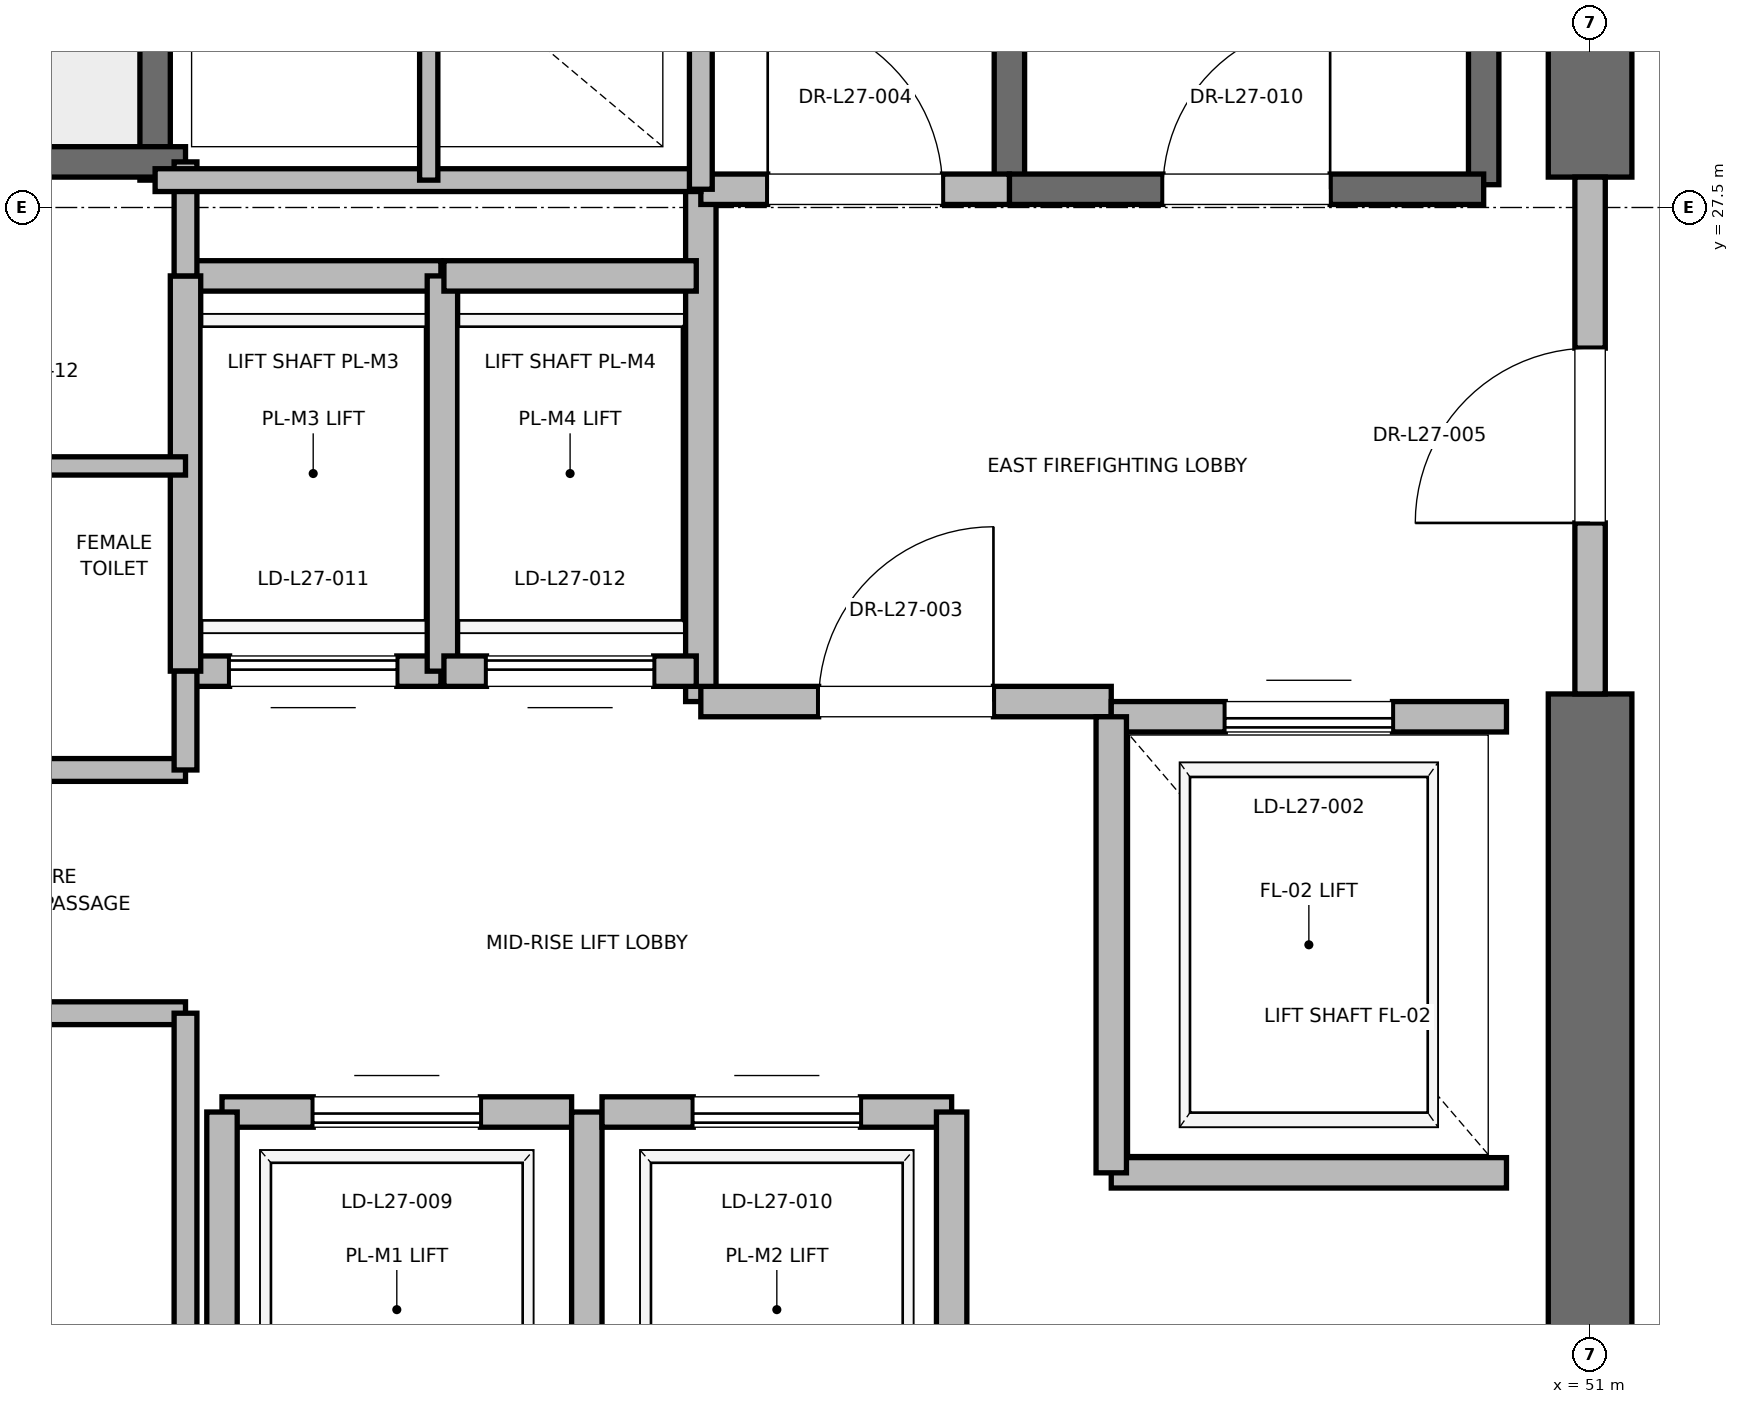
"""IFC4 building model, lengths in metres.
Left out: names, types, materials, properties, quantities, classifications, styles, units other than length and angle.
Written with IfcOpenShell. Run it as: python <this file> out.ifc"""

import sys

from ifc_helpers import new_model, si_unit, direction, frame, frame_2d, origin, place, context, subcontext, project, spatial, rectangle, extrude, element, fill, save


model = new_model("IFC4")
c1 = context("Model", 3, precision=1e-05, world=origin(), true_north=direction((0.0, 1.0)))
c2 = subcontext(c1, "Body", "Model", "MODEL_VIEW")
j1 = project(units=[si_unit("LENGTHUNIT", "METRE"), si_unit("PLANEANGLEUNIT", "RADIAN")], contexts=[c1])
p1 = place(None, origin())
s1 = spatial("IfcSite", under=j1, at=p1, CompositionType="ELEMENT")
p2 = place(p1, origin())
s2 = spatial("IfcBuilding", under=s1, at=p2, CompositionType="ELEMENT")
p3 = place(p2, frame((0.0, 0.0, 118.4)))
s3 = spatial("IfcBuildingStorey", under=s2, at=p3, CompositionType="ELEMENT", Elevation=118.4)
p4 = place(p3, frame((51.0, 18.5, 0.0), z_axis=(0.0, 0.0, 1.0), x_axis=(0.0, 1.0, 0.0)))
e1 = element("IfcWall", 1, at=p4, inside=s3, PredefinedType="SHEAR", context=c2, shape_type="SweptSolid", body=[
    extrude(rectangle(XDim=5.8, YDim=0.55, at=frame_2d((2.9, 0.0))), origin(), (0.0, 0.0, 1.0), 4.7),
])
p5 = place(p3, frame((51.0, 27.7, 0.0), z_axis=(0.0, 0.0, 1.0), x_axis=(0.0, 1.0, 0.0)))
e2 = element("IfcWall", 2, at=p5, inside=s3, PredefinedType="SHEAR", context=c2, shape_type="SweptSolid", body=[
    extrude(rectangle(XDim=8.8, YDim=0.55, at=frame_2d((4.4, 0.0))), origin(), (0.0, 0.0, 1.0), 4.7),
])
p6 = place(p3, frame((50.3, 27.65, 0.0), z_axis=(0.0, 0.0, 1.0), x_axis=(0.0, 1.0, 0.0)))
e3 = element("IfcWall", 3, at=p6, inside=s3, PredefinedType="SOLIDWALL", context=c2, shape_type="SweptSolid", body=[
    extrude(rectangle(XDim=8.15, YDim=0.2, at=frame_2d((4.075, 0.0))), origin(), (0.0, 0.0, 1.0), 4.7),
])
p7 = place(p3, frame((47.18, 27.62, 0.0), z_axis=(0.0, 0.0, 1.0), x_axis=(0.0, 1.0, 0.0)))
e4 = element("IfcWall", 4, at=p7, inside=s3, PredefinedType="SOLIDWALL", context=c2, shape_type="SweptSolid", body=[
    extrude(rectangle(XDim=8.18, YDim=0.2, at=frame_2d((4.09, 0.0))), origin(), (0.0, 0.0, 1.0), 4.7),
])
p8 = place(p3, frame((47.18, 27.62, 0.0), z_axis=(0.0, 0.0, 1.0), x_axis=(1.0, 0.0, 0.0)))
e5 = element("IfcWall", 5, at=p8, inside=s3, PredefinedType="SOLIDWALL", context=c2, shape_type="SweptSolid", body=[
    extrude(rectangle(XDim=3.12, YDim=0.2, at=frame_2d((1.56, 0.0))), origin(), (0.0, 0.0, 1.0), 4.7),
])
p9 = place(p8, frame((1.01, 0.0, 0.0)))
e6 = element("IfcOpeningElement", 6, at=p9, cuts=e5, PredefinedType="OPENING", context=c2, shape_type="SweptSolid", body=[
    extrude(rectangle(XDim=1.1, YDim=2.15, at=frame_2d((0.55, 1.075))), frame((0.0, 0.1, 0.0), z_axis=(0.0, -1.0, 0.0), x_axis=(1.0, 0.0, 0.0)), (0.0, 0.0, 1.0), 0.2),
])
p10 = place(p3, frame((41.56, 27.68, 0.0), z_axis=(0.0, 0.0, 1.0), x_axis=(0.0, 1.0, 0.0)))
e7 = element("IfcWall", 7, at=p10, inside=s3, PredefinedType="SOLIDWALL", context=c2, shape_type="SweptSolid", body=[
    extrude(rectangle(XDim=8.57, YDim=0.2, at=frame_2d((4.285, 0.0))), origin(), (0.0, 0.0, 1.0), 4.7),
])
p11 = place(p3, frame((38.44, 27.8, 0.0), z_axis=(0.0, 0.0, 1.0), x_axis=(1.0, 0.0, 0.0)))
e8 = element("IfcWall", 8, at=p11, inside=s3, PredefinedType="SOLIDWALL", context=c2, shape_type="SweptSolid", body=[
    extrude(rectangle(XDim=3.32, YDim=0.2, at=frame_2d((1.66, 0.0))), origin(), (0.0, 0.0, 1.0), 4.7),
])
p12 = place(p3, frame((45.15, 24.25, 0.0), z_axis=(0.0, 0.0, 1.0), x_axis=(0.0, 1.0, 0.0)))
e9 = element("IfcWall", 9, at=p12, inside=s3, PredefinedType="PARTITIONING", context=c2, shape_type="SweptSolid", body=[
    extrude(rectangle(XDim=3.37, YDim=0.2, at=frame_2d((1.685, 0.0))), origin(), (0.0, 0.0, 1.0), 4.7),
])
p13 = place(p3, frame((45.15, 24.25, 0.0), z_axis=(0.0, 0.0, 1.0), x_axis=(1.0, 0.0, 0.0)))
e10 = element("IfcWall", 10, at=p13, inside=s3, PredefinedType="PARTITIONING", context=c2, shape_type="SweptSolid", body=[
    extrude(rectangle(XDim=2.7, YDim=0.2, at=frame_2d((1.35, 0.0))), origin(), (0.0, 0.0, 1.0), 4.7),
])
p14 = place(p13, frame((0.775, 0.0, 0.0)))
e11 = element("IfcOpeningElement", 11, at=p14, cuts=e10, PredefinedType="OPENING", context=c2, shape_type="SweptSolid", body=[
    extrude(rectangle(XDim=1.15, YDim=2.2, at=frame_2d((0.575, 1.1))), frame((0.0, 0.1, 0.0), z_axis=(0.0, -1.0, 0.0), x_axis=(1.0, 0.0, 0.0)), (0.0, 0.0, 1.0), 0.2),
])
p15 = place(p3, frame((45.15, 27.62, 0.0), z_axis=(0.0, 0.0, 1.0), x_axis=(1.0, 0.0, 0.0)))
e12 = element("IfcWall", 12, at=p15, inside=s3, PredefinedType="PARTITIONING", context=c2, shape_type="SweptSolid", body=[
    extrude(rectangle(XDim=2.03, YDim=0.2, at=frame_2d((1.015, 0.0))), origin(), (0.0, 0.0, 1.0), 4.7),
])
p16 = place(p15, frame((0.44, 0.0, 0.0)))
e13 = element("IfcOpeningElement", 13, at=p16, cuts=e12, PredefinedType="OPENING", context=c2, shape_type="SweptSolid", body=[
    extrude(rectangle(XDim=1.15, YDim=2.2, at=frame_2d((0.575, 1.1))), frame((0.0, 0.1, 0.0), z_axis=(0.0, -1.0, 0.0), x_axis=(1.0, 0.0, 0.0)), (0.0, 0.0, 1.0), 0.2),
])
p17 = place(p3, frame((51.0, 24.3, 0.0), z_axis=(0.0, 0.0, 1.0), x_axis=(0.0, 1.0, 0.0)))
e14 = element("IfcWall", 14, at=p17, inside=s3, PredefinedType="PARTITIONING", context=c2, shape_type="SweptSolid", body=[
    extrude(rectangle(XDim=3.4, YDim=0.2, at=frame_2d((1.7, 0.0))), origin(), (0.0, 0.0, 1.0), 3.68),
])
p18 = place(p17, frame((1.125, 0.0, 0.0)))
e15 = element("IfcOpeningElement", 15, at=p18, cuts=e14, PredefinedType="OPENING", context=c2, shape_type="SweptSolid", body=[
    extrude(rectangle(XDim=1.15, YDim=2.2, at=frame_2d((0.575, 1.1))), frame((0.0, 0.1, 0.0), z_axis=(0.0, -1.0, 0.0), x_axis=(1.0, 0.0, 0.0)), (0.0, 0.0, 1.0), 0.2),
])
p19 = place(p3, frame((47.85, 21.15, 0.0), z_axis=(0.0, 0.0, 1.0), x_axis=(1.0, 0.0, 0.0)))
e16 = element("IfcWall", 16, at=p19, inside=s3, PredefinedType="SOLIDWALL", context=c2, shape_type="SweptSolid", body=[
    extrude(rectangle(XDim=2.6, YDim=0.2, at=frame_2d((1.3, 0.0))), origin(), (0.0, 0.0, 1.0), 4.7),
])
p20 = place(p3, frame((50.45, 24.15, 0.0), z_axis=(0.0, 0.0, 1.0), x_axis=(-1.0, 0.0, 0.0)))
e17 = element("IfcWall", 17, at=p20, inside=s3, PredefinedType="SOLIDWALL", context=c2, shape_type="SweptSolid", body=[
    extrude(rectangle(XDim=2.6, YDim=0.2, at=frame_2d((1.3, 0.0))), origin(), (0.0, 0.0, 1.0), 3.68),
])
p21 = place(p20, frame((0.75, 0.0, 0.0)))
e18 = element("IfcOpeningElement", 18, at=p21, cuts=e17, PredefinedType="OPENING", context=c2, shape_type="SweptSolid", body=[
    extrude(rectangle(XDim=1.1, YDim=2.2, at=frame_2d((0.55, 1.1))), frame((0.0, 0.1, 0.0), z_axis=(0.0, -1.0, 0.0), x_axis=(1.0, 0.0, 0.0)), (0.0, 0.0, 1.0), 0.2),
])
p22 = place(p3, frame((47.85, 24.15, 0.0), z_axis=(0.0, 0.0, 1.0), x_axis=(0.0, -1.0, 0.0)))
e19 = element("IfcWall", 19, at=p22, inside=s3, PredefinedType="SOLIDWALL", context=c2, shape_type="SweptSolid", body=[
    extrude(rectangle(XDim=3.0, YDim=0.2, at=frame_2d((1.5, 0.0))), origin(), (0.0, 0.0, 1.0), 4.7),
])
p23 = place(p3, frame((44.3, 21.55, 0.0), z_axis=(0.0, 0.0, 1.0), x_axis=(-1.0, 0.0, 0.0)))
e20 = element("IfcWall", 20, at=p23, inside=s3, PredefinedType="SOLIDWALL", context=c2, shape_type="SweptSolid", body=[
    extrude(rectangle(XDim=2.3, YDim=0.2, at=frame_2d((1.15, 0.0))), origin(), (0.0, 0.0, 1.0), 4.7),
])
p24 = place(p23, frame((0.6, 0.0, 0.0)))
e21 = element("IfcOpeningElement", 21, at=p24, cuts=e20, PredefinedType="OPENING", context=c2, shape_type="SweptSolid", body=[
    extrude(rectangle(XDim=1.1, YDim=2.2, at=frame_2d((0.55, 1.1))), frame((0.0, 0.1, 0.0), z_axis=(0.0, -1.0, 0.0), x_axis=(1.0, 0.0, 0.0)), (0.0, 0.0, 1.0), 0.2),
])
p25 = place(p3, frame((42.0, 21.55, 0.0), z_axis=(0.0, 0.0, 1.0), x_axis=(0.0, -1.0, 0.0)))
e22 = element("IfcWall", 22, at=p25, inside=s3, PredefinedType="SOLIDWALL", context=c2, shape_type="SweptSolid", body=[
    extrude(rectangle(XDim=2.6, YDim=0.2, at=frame_2d((1.3, 0.0))), origin(), (0.0, 0.0, 1.0), 3.68),
])
p26 = place(p3, frame((44.4, 18.95, 0.0), z_axis=(0.0, 0.0, 1.0), x_axis=(0.0, 1.0, 0.0)))
e23 = element("IfcWall", 23, at=p26, inside=s3, PredefinedType="SOLIDWALL", context=c2, shape_type="SweptSolid", body=[
    extrude(rectangle(XDim=2.6, YDim=0.2, at=frame_2d((1.3, 0.0))), origin(), (0.0, 0.0, 1.0), 4.7),
])
p27 = place(p3, frame((46.8, 21.55, 0.0), z_axis=(0.0, 0.0, 1.0), x_axis=(-1.0, 0.0, 0.0)))
e24 = element("IfcWall", 24, at=p27, inside=s3, PredefinedType="SOLIDWALL", context=c2, shape_type="SweptSolid", body=[
    extrude(rectangle(XDim=2.3, YDim=0.2, at=frame_2d((1.15, 0.0))), origin(), (0.0, 0.0, 1.0), 4.7),
])
p28 = place(p27, frame((0.6, 0.0, 0.0)))
e25 = element("IfcOpeningElement", 25, at=p28, cuts=e24, PredefinedType="OPENING", context=c2, shape_type="SweptSolid", body=[
    extrude(rectangle(XDim=1.1, YDim=2.2, at=frame_2d((0.55, 1.1))), frame((0.0, 0.1, 0.0), z_axis=(0.0, -1.0, 0.0), x_axis=(1.0, 0.0, 0.0)), (0.0, 0.0, 1.0), 0.2),
])
p29 = place(p3, frame((46.8, 18.95, 0.0), z_axis=(0.0, 0.0, 1.0), x_axis=(0.0, 1.0, 0.0)))
e26 = element("IfcWall", 26, at=p29, inside=s3, PredefinedType="SOLIDWALL", context=c2, shape_type="SweptSolid", body=[
    extrude(rectangle(XDim=2.6, YDim=0.2, at=frame_2d((1.3, 0.0))), origin(), (0.0, 0.0, 1.0), 4.7),
])
p30 = place(p3, frame((41.76, 24.45, 0.0), z_axis=(0.0, 0.0, 1.0), x_axis=(1.0, 0.0, 0.0)))
e27 = element("IfcWall", 27, at=p30, inside=s3, PredefinedType="SOLIDWALL", context=c2, shape_type="SweptSolid", body=[
    extrude(rectangle(XDim=1.68, YDim=0.2, at=frame_2d((0.84, 0.0))), origin(), (0.0, 0.0, 1.0), 4.7),
])
p31 = place(p30, frame((0.29, 0.0, 0.0)))
e28 = element("IfcOpeningElement", 28, at=p31, cuts=e27, PredefinedType="OPENING", context=c2, shape_type="SweptSolid", body=[
    extrude(rectangle(XDim=1.1, YDim=2.2, at=frame_2d((0.55, 1.1))), frame((0.0, 0.1, 0.0), z_axis=(0.0, -1.0, 0.0), x_axis=(1.0, 0.0, 0.0)), (0.0, 0.0, 1.0), 0.2),
])
p32 = place(p3, frame((43.44, 27.05, 0.0), z_axis=(0.0, 0.0, 1.0), x_axis=(-1.0, 0.0, 0.0)))
e29 = element("IfcWall", 29, at=p32, inside=s3, PredefinedType="SOLIDWALL", context=c2, shape_type="SweptSolid", body=[
    extrude(rectangle(XDim=1.68, YDim=0.2, at=frame_2d((0.84, 0.0))), origin(), (0.0, 0.0, 1.0), 4.7),
])
for number, where, z_axis, x_axis in (
    (30, (41.76, 27.05, 0.0), (0.0, 0.0, 1.0), (0.0, -1.0, 0.0)),
    (31, (43.45, 24.45, 0.0), (0.0, 0.0, 1.0), (0.0, 1.0, 0.0)),
):
    element("IfcWall", number, at=place(p3, frame(where, z_axis=z_axis, x_axis=x_axis)), inside=s3, PredefinedType="SOLIDWALL", context=c2, shape_type="SweptSolid", body=[
        extrude(rectangle(XDim=2.6, YDim=0.2, at=frame_2d((1.3, 0.0))), origin(), (0.0, 0.0, 1.0), 4.7),
    ])
p33 = place(p3, frame((43.46, 24.45, 0.0), z_axis=(0.0, 0.0, 1.0), x_axis=(1.0, 0.0, 0.0)))
e32 = element("IfcWall", 32, at=p33, inside=s3, PredefinedType="SOLIDWALL", context=c2, shape_type="SweptSolid", body=[
    extrude(rectangle(XDim=1.66, YDim=0.2, at=frame_2d((0.83, 0.0))), origin(), (0.0, 0.0, 1.0), 4.7),
])
p34 = place(p33, frame((0.28, 0.0, 0.0)))
e33 = element("IfcOpeningElement", 33, at=p34, cuts=e32, PredefinedType="OPENING", context=c2, shape_type="SweptSolid", body=[
    extrude(rectangle(XDim=1.1, YDim=2.2, at=frame_2d((0.55, 1.1))), frame((0.0, 0.1, 0.0), z_axis=(0.0, -1.0, 0.0), x_axis=(1.0, 0.0, 0.0)), (0.0, 0.0, 1.0), 0.2),
])
p35 = place(p3, frame((45.12, 27.05, 0.0), z_axis=(0.0, 0.0, 1.0), x_axis=(-1.0, 0.0, 0.0)))
e34 = element("IfcWall", 34, at=p35, inside=s3, PredefinedType="SOLIDWALL", context=c2, shape_type="SweptSolid", body=[
    extrude(rectangle(XDim=1.66, YDim=0.2, at=frame_2d((0.83, 0.0))), origin(), (0.0, 0.0, 1.0), 4.7),
])
for number, where, z_axis, x_axis in (
    (35, (39.95, 22.2, 0.0), (0.0, 0.0, 1.0), (1.0, 0.0, 0.0)),
    (36, (39.95, 23.8, 0.0), (0.0, 0.0, 1.0), (1.0, 0.0, 0.0)),
):
    element("IfcWall", number, at=place(p3, frame(where, z_axis=z_axis, x_axis=x_axis)), inside=s3, PredefinedType="PARTITIONING", context=c2, shape_type="SweptSolid", body=[
        extrude(rectangle(XDim=1.81, YDim=0.15, at=frame_2d((0.905, 0.0))), origin(), (0.0, 0.0, 1.0), 2.85),
    ])
p36 = place(p3, frame((39.95, 25.8, 0.0), z_axis=(0.0, 0.0, 1.0), x_axis=(1.0, 0.0, 0.0)))
e37 = element("IfcWall", 37, at=p36, inside=s3, PredefinedType="PARTITIONING", context=c2, shape_type="SweptSolid", body=[
    extrude(rectangle(XDim=1.81, YDim=0.12, at=frame_2d((0.905, 0.0))), origin(), (0.0, 0.0, 1.0), 2.85),
])
p37 = place(p3, frame((41.76, 18.6, 0.0), z_axis=(0.0, 0.0, 1.0), x_axis=(0.0, 1.0, 0.0)))
e38 = element("IfcWall", 38, at=p37, inside=s3, PredefinedType="PARTITIONING", context=c2, shape_type="SweptSolid", body=[
    extrude(rectangle(XDim=3.6, YDim=0.15, at=frame_2d((1.8, 0.0))), origin(), (0.0, 0.0, 1.0), 2.85),
])
p38 = place(p3, frame((41.76, 23.8, 0.0), z_axis=(0.0, 0.0, 1.0), x_axis=(0.0, 1.0, 0.0)))
e39 = element("IfcWall", 39, at=p38, inside=s3, PredefinedType="PARTITIONING", context=c2, shape_type="SweptSolid", body=[
    extrude(rectangle(XDim=0.65, YDim=0.15, at=frame_2d((0.325, 0.0))), origin(), (0.0, 0.0, 1.0), 2.85),
])
p39 = place(p3, frame((41.76, 27.05, 0.0), z_axis=(0.0, 0.0, 1.0), x_axis=(0.0, 1.0, 0.0)))
e40 = element("IfcWall", 40, at=p39, inside=s3, PredefinedType="PARTITIONING", context=c2, shape_type="SweptSolid", body=[
    extrude(rectangle(XDim=0.75, YDim=0.15, at=frame_2d((0.375, 0.0))), origin(), (0.0, 0.0, 1.0), 2.85),
])
p40 = place(p3, frame((41.56, 27.68, 0.0), z_axis=(0.0, 0.0, 1.0), x_axis=(1.0, 0.0, 0.0)))
e41 = element("IfcWall", 41, at=p40, inside=s3, PredefinedType="PARTITIONING", context=c2, shape_type="SweptSolid", body=[
    extrude(rectangle(XDim=3.59, YDim=0.15, at=frame_2d((1.795, 0.0))), origin(), (0.0, 0.0, 1.0), 2.85),
])
p41 = place(p3, frame((45.15, 27.62, 0.0), z_axis=(0.0, 0.0, 1.0), x_axis=(0.0, 1.0, 0.0)))
e42 = element("IfcWall", 42, at=p41, inside=s3, PredefinedType="PARTITIONING", context=c2, shape_type="SweptSolid", body=[
    extrude(rectangle(XDim=3.1, YDim=0.15, at=frame_2d((1.55, 0.0))), origin(), (0.0, 0.0, 1.0), 2.85),
])
p42 = place(p3, frame((43.36, 27.68, 0.0), z_axis=(0.0, 0.0, 1.0), x_axis=(0.0, 1.0, 0.0)))
e43 = element("IfcWall", 43, at=p42, inside=s3, PredefinedType="PARTITIONING", context=c2, shape_type="SweptSolid", body=[
    extrude(rectangle(XDim=3.04, YDim=0.12, at=frame_2d((1.52, 0.0))), origin(), (0.0, 0.0, 1.0), 2.85),
])
p43 = place(p9, origin())
e44 = element("IfcDoor", 44, at=p43, inside=s3, OperationType="SINGLE_SWING_RIGHT", PredefinedType="DOOR", context=c2, shape_type="SweptSolid", body=[
    extrude(rectangle(XDim=1.1, YDim=2.15, at=frame_2d((0.55, 1.075))), frame((0.0, 0.025, 0.0), z_axis=(0.0, -1.0, 0.0), x_axis=(1.0, 0.0, 0.0)), (0.0, 0.0, 1.0), 0.05),
])
fill(e6, e44)
p44 = place(p14, origin())
e45 = element("IfcDoor", 45, at=p44, inside=s3, OperationType="SINGLE_SWING_RIGHT", PredefinedType="DOOR", context=c2, shape_type="SweptSolid", body=[
    extrude(rectangle(XDim=1.15, YDim=2.2, at=frame_2d((0.575, 1.1))), frame((0.0, 0.025, 0.0), z_axis=(0.0, -1.0, 0.0), x_axis=(1.0, 0.0, 0.0)), (0.0, 0.0, 1.0), 0.05),
])
fill(e11, e45)
p45 = place(p16, origin())
e46 = element("IfcDoor", 46, at=p45, inside=s3, OperationType="SINGLE_SWING_LEFT", PredefinedType="DOOR", context=c2, shape_type="SweptSolid", body=[
    extrude(rectangle(XDim=1.15, YDim=2.2, at=frame_2d((0.575, 1.1))), frame((0.0, 0.025, 0.0), z_axis=(0.0, -1.0, 0.0), x_axis=(1.0, 0.0, 0.0)), (0.0, 0.0, 1.0), 0.05),
])
fill(e13, e46)
p46 = place(p18, origin())
e47 = element("IfcDoor", 47, at=p46, inside=s3, OperationType="SINGLE_SWING_LEFT", PredefinedType="DOOR", context=c2, shape_type="SweptSolid", body=[
    extrude(rectangle(XDim=1.15, YDim=2.2, at=frame_2d((0.575, 1.1))), frame((0.0, 0.025, 0.0), z_axis=(0.0, -1.0, 0.0), x_axis=(1.0, 0.0, 0.0)), (0.0, 0.0, 1.0), 0.05),
])
fill(e15, e47)
p47 = place(p21, origin())
e48 = element("IfcDoor", 48, at=p47, inside=s3, OperationType="SLIDING_TO_RIGHT", PredefinedType="DOOR", context=c2, shape_type="SweptSolid", body=[
    extrude(rectangle(XDim=1.1, YDim=2.2, at=frame_2d((0.55, 1.1))), frame((0.0, 0.025, 0.0), z_axis=(0.0, -1.0, 0.0), x_axis=(1.0, 0.0, 0.0)), (0.0, 0.0, 1.0), 0.05),
])
fill(e18, e48)
p48 = place(p24, origin())
e49 = element("IfcDoor", 49, at=p48, inside=s3, OperationType="SLIDING_TO_RIGHT", PredefinedType="DOOR", context=c2, shape_type="SweptSolid", body=[
    extrude(rectangle(XDim=1.1, YDim=2.2, at=frame_2d((0.55, 1.1))), frame((0.0, 0.025, 0.0), z_axis=(0.0, -1.0, 0.0), x_axis=(1.0, 0.0, 0.0)), (0.0, 0.0, 1.0), 0.05),
])
fill(e21, e49)
p49 = place(p28, origin())
e50 = element("IfcDoor", 50, at=p49, inside=s3, OperationType="SLIDING_TO_RIGHT", PredefinedType="DOOR", context=c2, shape_type="SweptSolid", body=[
    extrude(rectangle(XDim=1.1, YDim=2.2, at=frame_2d((0.55, 1.1))), frame((0.0, 0.025, 0.0), z_axis=(0.0, -1.0, 0.0), x_axis=(1.0, 0.0, 0.0)), (0.0, 0.0, 1.0), 0.05),
])
fill(e25, e50)
p50 = place(p31, origin())
e51 = element("IfcDoor", 51, at=p50, inside=s3, OperationType="SLIDING_TO_RIGHT", PredefinedType="DOOR", context=c2, shape_type="SweptSolid", body=[
    extrude(rectangle(XDim=1.1, YDim=2.2, at=frame_2d((0.55, 1.1))), frame((0.0, 0.025, 0.0), z_axis=(0.0, -1.0, 0.0), x_axis=(1.0, 0.0, 0.0)), (0.0, 0.0, 1.0), 0.05),
])
fill(e28, e51)
p51 = place(p34, origin())
e52 = element("IfcDoor", 52, at=p51, inside=s3, OperationType="SLIDING_TO_RIGHT", PredefinedType="DOOR", context=c2, shape_type="SweptSolid", body=[
    extrude(rectangle(XDim=1.1, YDim=2.2, at=frame_2d((0.55, 1.1))), frame((0.0, 0.025, 0.0), z_axis=(0.0, -1.0, 0.0), x_axis=(1.0, 0.0, 0.0)), (0.0, 0.0, 1.0), 0.05),
])
fill(e33, e52)
save(model, sys.argv[1])
